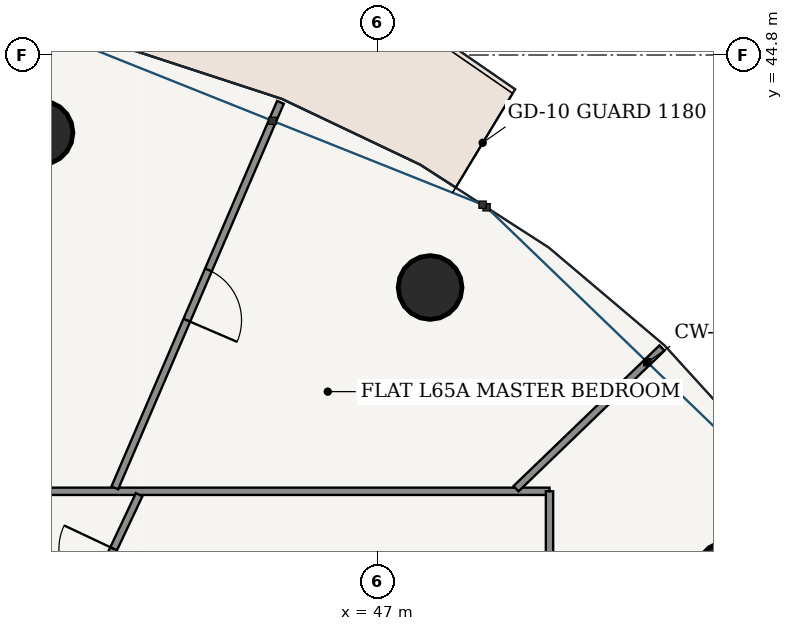
"""IFC4 building model, lengths in metres.
Left out: names, types, materials, properties, quantities, classifications, styles, units other than length and angle.
Written with IfcOpenShell. Run it as: python <this file> out.ifc"""

import sys

from ifc_helpers import new_model, si_unit, direction, frame, frame_2d, origin, origin_2d, place, context, subcontext, project, spatial, rectangle, hollow_circle, extrude, source, transform, mapped, element, fill, save


model = new_model("IFC4")
c1 = context("Model", 3, precision=1e-05, world=origin(), true_north=direction((-0.2419218956, 0.970295726276)))
c2 = subcontext(c1, "Body", "Model", "MODEL_VIEW")
j1 = project(units=[si_unit("LENGTHUNIT", "METRE"), si_unit("PLANEANGLEUNIT", "RADIAN")], contexts=[c1])
p1 = place(None, origin())
s1 = spatial("IfcSite", under=j1, at=p1, CompositionType="ELEMENT")
p2 = place(p1, origin())
s2 = spatial("IfcBuilding", under=s1, at=p2, CompositionType="ELEMENT")
p3 = place(p2, frame((0.0, 0.0, 248.2)))
s3 = spatial("IfcBuildingStorey", under=s2, at=p3, CompositionType="ELEMENT", Elevation=248.2)
for number, where, z_axis, x_axis in (
    (1, (52.759, 36.272, 0.0), (0.0, 0.0, 1.0), (1.0, 0.0, 0.0)),
    (2, (47.861, 40.977, 0.0), (0.0, 0.0, 1.0), (1.0, 0.0, 0.0)),
    (3, (41.463, 43.522, 0.0), (0.0, 0.0, 1.0), (1.0, 0.0, 0.0)),
):
    element("IfcColumn", number, at=place(p3, frame(where, z_axis=z_axis, x_axis=x_axis)), inside=s3, PredefinedType="COLUMN", context=c2, shape_type="SweptSolid", body=[
        extrude(hollow_circle(Radius=0.525, WallThickness=0.035, at=origin_2d()), origin(), (0.0, 0.0, 1.0), 3.75),
    ])
p4 = place(p3, frame((26.175, 37.625, 0.0), z_axis=(0.0, 0.0, 1.0), x_axis=(1.0, 0.0, 0.0)))
e4 = element("IfcWall", 4, at=p4, inside=s3, PredefinedType="PARTITIONING", context=c2, shape_type="SweptSolid", body=[
    extrude(rectangle(XDim=23.65, YDim=0.12, at=frame_2d((11.825, 0.0))), origin(), (0.0, 0.0, 1.0), 3.015),
])
p5 = place(p4, frame((12.791, 0.0, 0.0)))
e5 = element("IfcOpeningElement", 5, at=p5, cuts=e4, PredefinedType="OPENING", context=c2, shape_type="SweptSolid", body=[
    extrude(rectangle(XDim=0.9, YDim=2.15, at=frame_2d((0.45, 1.075))), frame((0.0, 0.07, 0.0), z_axis=(0.0, -1.0, 0.0), x_axis=(1.0, 0.0, 0.0)), (0.0, 0.0, 1.0), 0.14),
])
p6 = place(p4, frame((6.48, 0.0, 0.0)))
e6 = element("IfcOpeningElement", 6, at=p6, cuts=e4, PredefinedType="OPENING", context=c2, shape_type="SweptSolid", body=[
    extrude(rectangle(XDim=0.9, YDim=2.15, at=frame_2d((0.45, 1.075))), frame((0.0, 0.07, 0.0), z_axis=(0.0, -1.0, 0.0), x_axis=(1.0, 0.0, 0.0)), (0.0, 0.0, 1.0), 0.14),
])
p7 = place(p4, frame((1.831, 0.0, 0.0)))
e7 = element("IfcOpeningElement", 7, at=p7, cuts=e4, PredefinedType="OPENING", context=c2, shape_type="SweptSolid", body=[
    extrude(rectangle(XDim=0.9, YDim=2.15, at=frame_2d((0.45, 1.075))), frame((0.0, 0.07, 0.0), z_axis=(0.0, -1.0, 0.0), x_axis=(1.0, 0.0, 0.0)), (0.0, 0.0, 1.0), 0.14),
])
p8 = place(p3, frame((49.825, 37.625, 0.0), z_axis=(0.0, 0.0, 1.0), x_axis=(0.0, -1.0, 0.0)))
e8 = element("IfcWall", 8, at=p8, inside=s3, PredefinedType="PARTITIONING", context=c2, shape_type="SweptSolid", body=[
    extrude(rectangle(XDim=3.615, YDim=0.12, at=frame_2d((1.808, 0.0))), origin(), (0.0, 0.0, 1.0), 3.015),
])
p9 = place(p3, frame((49.275, 37.668, 0.0), z_axis=(0.0, 0.0, 1.0), x_axis=(0.719954096891, 0.694021684366, 0.0)))
e9 = element("IfcWall", 9, at=p9, inside=s3, PredefinedType="PARTITIONING", context=c2, shape_type="SweptSolid", body=[
    extrude(rectangle(XDim=3.333, YDim=0.12, at=frame_2d((1.667, 0.0))), origin(), (0.0, 0.0, 1.0), 3.121),
])
p10 = place(p3, frame((42.676, 37.682, 0.0), z_axis=(0.0, 0.0, 1.0), x_axis=(0.394777489933, 0.918776759307, 0.0)))
e10 = element("IfcWall", 10, at=p10, inside=s3, PredefinedType="PARTITIONING", context=c2, shape_type="SweptSolid", body=[
    extrude(rectangle(XDim=6.9, YDim=0.12, at=frame_2d((3.45, 0.0))), origin(), (0.0, 0.0, 1.0), 3.121),
])
p11 = place(p10, frame((3.0, 0.0, 0.0)))
e11 = element("IfcOpeningElement", 11, at=p11, cuts=e10, PredefinedType="OPENING", context=c2, shape_type="SweptSolid", body=[
    extrude(rectangle(XDim=0.9, YDim=2.15, at=frame_2d((0.45, 1.075))), frame((0.0, 0.07, 0.0), z_axis=(0.0, -1.0, 0.0), x_axis=(1.0, 0.0, 0.0)), (0.0, 0.0, 1.0), 0.14),
])
p12 = place(p3, frame((41.854, 34.977, 0.0), z_axis=(0.0, 0.0, 1.0), x_axis=(0.42640827804, 0.904530806783, 0.0)))
e12 = element("IfcWall", 12, at=p12, inside=s3, PredefinedType="PARTITIONING", context=c2, shape_type="SweptSolid", body=[
    extrude(rectangle(XDim=2.866, YDim=0.12, at=frame_2d((1.433, 0.0))), origin(), (0.0, 0.0, 1.0), 3.49),
])
p13 = place(p12, frame((0.983, 0.0, 0.0)))
e13 = element("IfcOpeningElement", 13, at=p13, cuts=e12, PredefinedType="OPENING", context=c2, shape_type="SweptSolid", body=[
    extrude(rectangle(XDim=0.9, YDim=2.15, at=frame_2d((0.45, 1.075))), frame((0.0, 0.07, 0.0), z_axis=(0.0, -1.0, 0.0), x_axis=(1.0, 0.0, 0.0)), (0.0, 0.0, 1.0), 0.14),
])
m1 = source(origin(), c2, "Body", "SweptSolid", [
    extrude(rectangle(XDim=0.9, YDim=2.15, at=frame_2d((0.45, 1.075))), frame((0.0, 0.025, 0.0), z_axis=(0.0, -1.0, 0.0), x_axis=(1.0, 0.0, 0.0)), (0.0, 0.0, 1.0), 0.05),
])
p14 = place(p13, origin())
e14 = element("IfcDoor", 14, at=p14, inside=s3, OperationType="SINGLE_SWING_RIGHT", PredefinedType="DOOR", context=c2, shape_type="MappedRepresentation", body=[
    mapped(m1, transform((0.0, 0.0, 0.0), scale=1.0)),
])
fill(e13, e14)
p15 = place(p11, frame((0.9, 0.0, 0.0), z_axis=(0.0, 0.0, 1.0), x_axis=(-1.0, 0.0, 0.0)))
e15 = element("IfcDoor", 15, at=p15, inside=s3, OperationType="SINGLE_SWING_RIGHT", PredefinedType="DOOR", context=c2, shape_type="MappedRepresentation", body=[
    mapped(m1, transform((0.0, 0.0, 0.0), scale=1.0)),
])
fill(e11, e15)
save(model, sys.argv[1])
